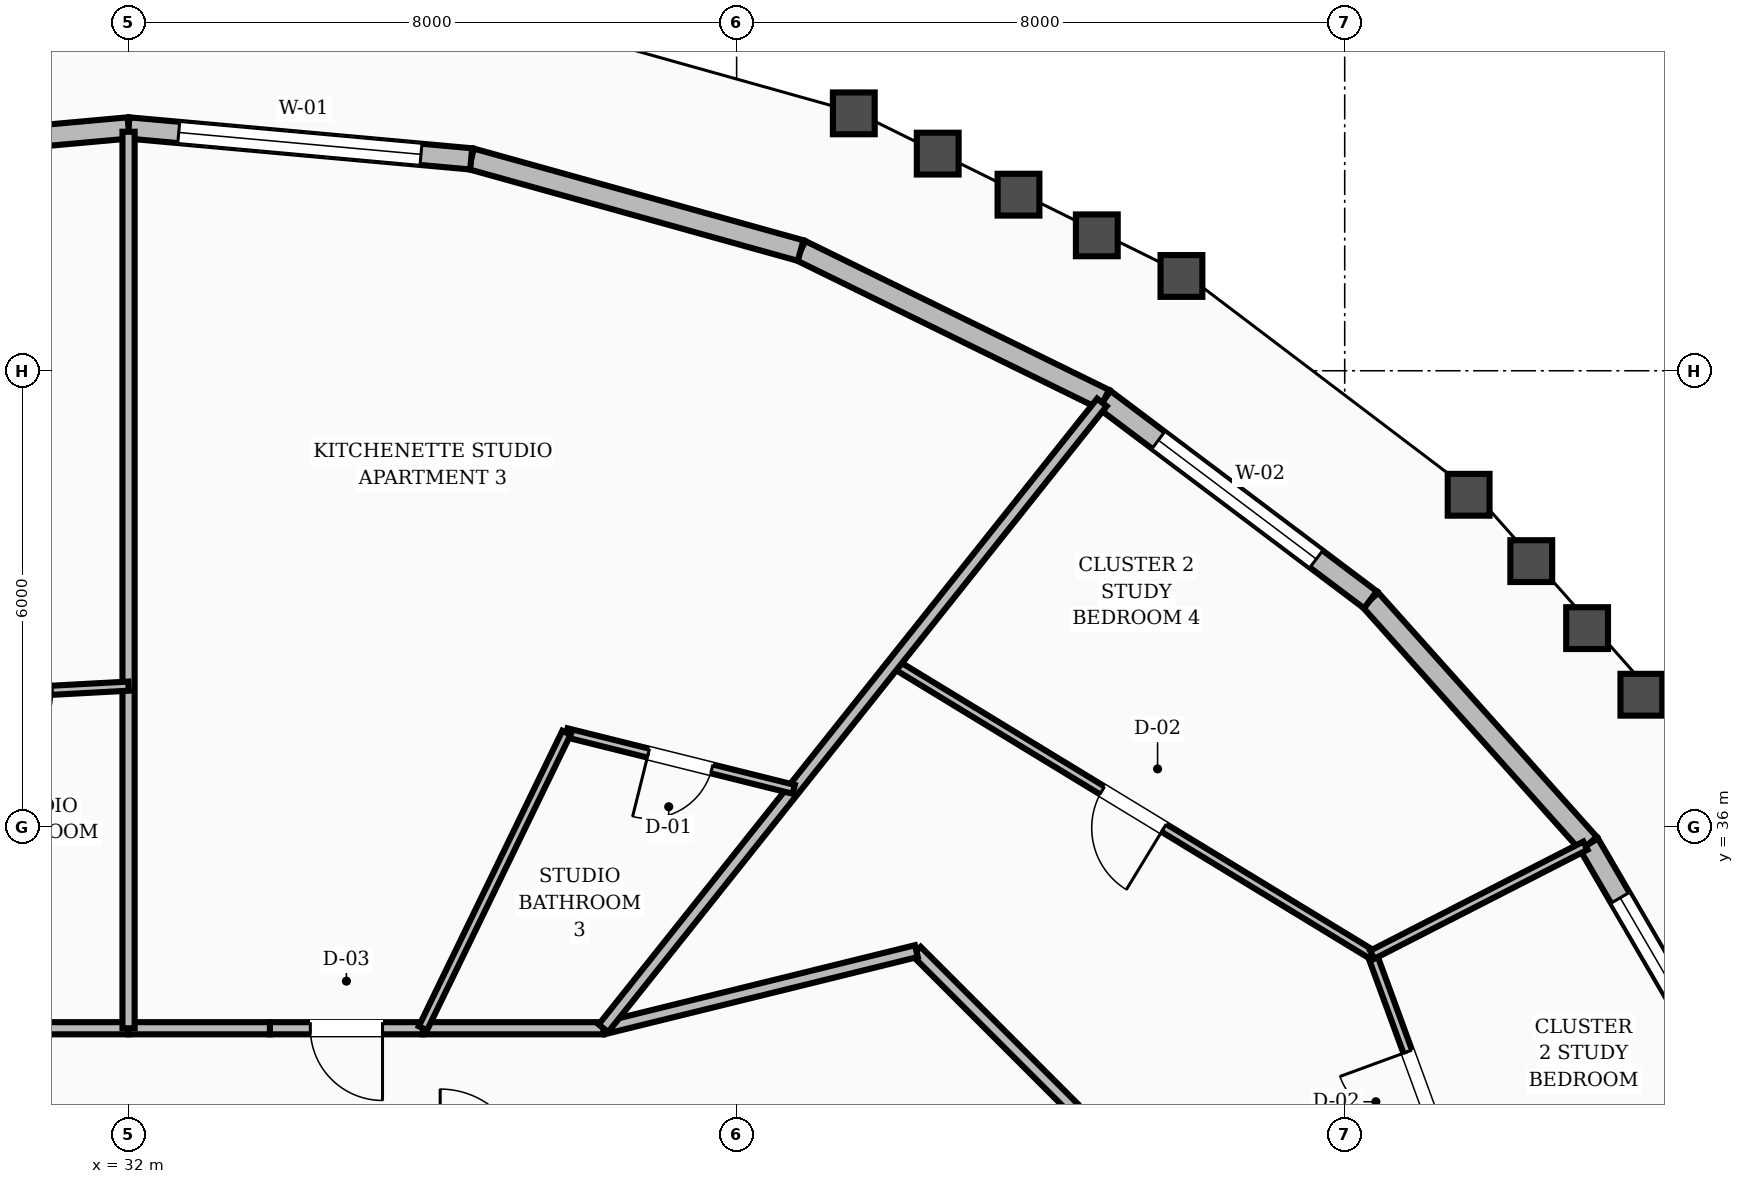
"""IFC4 building model, lengths in metres.
Left out: names, types, materials, properties, quantities, classifications, styles, units other than length and angle.
Written with IfcOpenShell. Run it as: python <this file> out.ifc"""

import sys

from ifc_helpers import new_model, si_unit, direction, frame, frame_2d, origin, place, context, subcontext, project, spatial, rectangle, extrude, element, fill, save


model = new_model("IFC4")
c1 = context("Model", 3, precision=1e-05, world=origin(), true_north=direction((0.0, 1.0)))
c2 = subcontext(c1, "Body", "Model", "MODEL_VIEW")
j1 = project(units=[si_unit("LENGTHUNIT", "METRE"), si_unit("PLANEANGLEUNIT", "RADIAN")], contexts=[c1])
p1 = place(None, origin())
s1 = spatial("IfcSite", under=j1, at=p1, CompositionType="ELEMENT")
p2 = place(p1, origin())
s2 = spatial("IfcBuilding", under=s1, at=p2, CompositionType="ELEMENT")
p3 = place(p2, frame((0.0, 0.0, 222.0)))
s3 = spatial("IfcBuildingStorey", under=s2, at=p3, CompositionType="ELEMENT", Elevation=222.0)
p4 = place(p3, frame((53.347, 32.111, 0.0), z_axis=(0.0, 0.0, 1.0), x_axis=(-0.503498718903, 0.863995972249, 0.0)))
e1 = element("IfcWall", 1, at=p4, inside=s3, PredefinedType="STANDARD", context=c2, shape_type="SweptSolid", body=[
    extrude(rectangle(XDim=4.241, YDim=0.28, at=frame_2d((2.12, 0.0))), origin(), (0.0, 0.0, 1.0), 2.88),
])
p5 = place(p4, frame((0.821, 0.0, 0.8)))
e2 = element("IfcOpeningElement", 2, at=p5, cuts=e1, PredefinedType="OPENING", context=c2, shape_type="SweptSolid", body=[
    extrude(rectangle(XDim=2.6, YDim=1.65, at=frame_2d((1.3, 0.825))), frame((0.0, 0.15, 0.0), z_axis=(0.0, -1.0, 0.0), x_axis=(1.0, 0.0, 0.0)), (0.0, 0.0, 1.0), 0.3),
])
p6 = place(p3, frame((51.211, 35.775, 0.0), z_axis=(0.0, 0.0, 1.0), x_axis=(-0.666726962521, 0.745302057858, 0.0)))
e3 = element("IfcWall", 3, at=p6, inside=s3, PredefinedType="STANDARD", context=c2, shape_type="SweptSolid", body=[
    extrude(rectangle(XDim=4.31, YDim=0.28, at=frame_2d((2.155, 0.0))), origin(), (0.0, 0.0, 1.0), 2.88),
])
p7 = place(p3, frame((48.338, 38.987, 0.0), z_axis=(0.0, 0.0, 1.0), x_axis=(-0.798942565337, 0.601407330594, 0.0)))
e4 = element("IfcWall", 4, at=p7, inside=s3, PredefinedType="STANDARD", context=c2, shape_type="SweptSolid", body=[
    extrude(rectangle(XDim=4.383, YDim=0.28, at=frame_2d((2.191, 0.0))), origin(), (0.0, 0.0, 1.0), 2.88),
])
p8 = place(p7, frame((0.891, 0.0, 0.8)))
e5 = element("IfcOpeningElement", 5, at=p8, cuts=e4, PredefinedType="OPENING", context=c2, shape_type="SweptSolid", body=[
    extrude(rectangle(XDim=2.6, YDim=1.65, at=frame_2d((1.3, 0.825))), frame((0.0, 0.15, 0.0), z_axis=(0.0, -1.0, 0.0), x_axis=(1.0, 0.0, 0.0)), (0.0, 0.0, 1.0), 0.3),
])
p9 = place(p3, frame((44.837, 41.623, 0.0), z_axis=(0.0, 0.0, 1.0), x_axis=(-0.897868409718, 0.440263919519, 0.0)))
e6 = element("IfcWall", 6, at=p9, inside=s3, PredefinedType="STANDARD", context=c2, shape_type="SweptSolid", body=[
    extrude(rectangle(XDim=4.449, YDim=0.28, at=frame_2d((2.225, 0.0))), origin(), (0.0, 0.0, 1.0), 2.88),
])
p10 = place(p3, frame((40.842, 43.581, 0.0), z_axis=(0.0, 0.0, 1.0), x_axis=(-0.963397305611, 0.268077659535, 0.0)))
e7 = element("IfcWall", 7, at=p10, inside=s3, PredefinedType="STANDARD", context=c2, shape_type="SweptSolid", body=[
    extrude(rectangle(XDim=4.499, YDim=0.28, at=frame_2d((2.25, 0.0))), origin(), (0.0, 0.0, 1.0), 2.88),
])
p11 = place(p3, frame((36.508, 44.787, 0.0), z_axis=(0.0, 0.0, 1.0), x_axis=(-0.995944333691, 0.089971574339, 0.0)))
e8 = element("IfcWall", 8, at=p11, inside=s3, PredefinedType="STANDARD", context=c2, shape_type="SweptSolid", body=[
    extrude(rectangle(XDim=4.526, YDim=0.28, at=frame_2d((2.263, 0.0))), origin(), (0.0, 0.0, 1.0), 2.88),
])
p12 = place(p11, frame((0.663, 0.0, 0.8)))
e9 = element("IfcOpeningElement", 9, at=p12, cuts=e8, PredefinedType="OPENING", context=c2, shape_type="SweptSolid", body=[
    extrude(rectangle(XDim=3.2, YDim=1.65, at=frame_2d((1.6, 0.825))), frame((0.0, 0.15, 0.0), z_axis=(0.0, -1.0, 0.0), x_axis=(1.0, 0.0, 0.0)), (0.0, 0.0, 1.0), 0.3),
])
p13 = place(p3, frame((32.0, 45.195, 0.0), z_axis=(0.0, 0.0, 1.0), x_axis=(-0.995944333691, -0.089971574339, 0.0)))
e10 = element("IfcWall", 10, at=p13, inside=s3, PredefinedType="STANDARD", context=c2, shape_type="SweptSolid", body=[
    extrude(rectangle(XDim=4.526, YDim=0.28, at=frame_2d((2.263, 0.0))), origin(), (0.0, 0.0, 1.0), 2.88),
])
p14 = place(p3, frame((44.427, 32.303, 0.0), z_axis=(0.0, 0.0, 1.0), x_axis=(-0.707106781187, 0.707106781187, 0.0)))
e11 = element("IfcWall", 11, at=p14, inside=s3, PredefinedType="SOLIDWALL", context=c2, shape_type="SweptSolid", body=[
    extrude(rectangle(XDim=2.916, YDim=0.16, at=frame_2d((1.458, 0.0))), origin(), (0.0, 0.0, 1.0), 2.87),
])
p15 = place(p3, frame((42.365, 34.365, 0.0), z_axis=(0.0, 0.0, 1.0), x_axis=(-0.970939799552, -0.239323850978, 0.0)))
e12 = element("IfcWall", 12, at=p15, inside=s3, PredefinedType="SOLIDWALL", context=c2, shape_type="SweptSolid", body=[
    extrude(rectangle(XDim=4.241, YDim=0.16, at=frame_2d((2.12, 0.0))), origin(), (0.0, 0.0, 1.0), 2.87),
])
p16 = place(p3, frame((38.248, 33.35, 0.0), z_axis=(0.0, 0.0, 1.0), x_axis=(-1.0, 0.0, 0.0)))
e13 = element("IfcWall", 13, at=p16, inside=s3, PredefinedType="SOLIDWALL", context=c2, shape_type="SweptSolid", body=[
    extrude(rectangle(XDim=2.375, YDim=0.16, at=frame_2d((1.188, 0.0))), origin(), (0.0, 0.0, 1.0), 2.87),
])
p17 = place(p3, frame((35.873, 33.35, 0.0), z_axis=(0.0, 0.0, 1.0), x_axis=(-1.0, 0.0, 0.0)))
e14 = element("IfcWall", 14, at=p17, inside=s3, PredefinedType="SOLIDWALL", context=c2, shape_type="SweptSolid", body=[
    extrude(rectangle(XDim=2.013, YDim=0.16, at=frame_2d((1.006, 0.0))), origin(), (0.0, 0.0, 1.0), 2.87),
])
p18 = place(p17, frame((0.531, 0.0, 0.0)))
e15 = element("IfcOpeningElement", 15, at=p18, cuts=e14, PredefinedType="OPENING", context=c2, shape_type="SweptSolid", body=[
    extrude(rectangle(XDim=0.95, YDim=2.1, at=frame_2d((0.475, 1.05))), frame((0.0, 0.09, 0.0), z_axis=(0.0, -1.0, 0.0), x_axis=(1.0, 0.0, 0.0)), (0.0, 0.0, 1.0), 0.18),
])
for number, where, z_axis, x_axis in (
    (16, (33.86, 33.35, 0.0), (0.0, 0.0, 1.0), (-1.0, 0.0, 0.0)),
    (17, (32.0, 33.35, 0.0), (0.0, 0.0, 1.0), (-1.0, 0.0, 0.0)),
):
    element("IfcWall", number, at=place(p3, frame(where, z_axis=z_axis, x_axis=x_axis)), inside=s3, PredefinedType="SOLIDWALL", context=c2, shape_type="SweptSolid", body=[
        extrude(rectangle(XDim=1.86, YDim=0.16, at=frame_2d((0.93, 0.0))), origin(), (0.0, 0.0, 1.0), 2.87),
    ])
p19 = place(p3, frame((49.623, 30.875, 0.0), z_axis=(0.0, 0.0, 1.0), x_axis=(-0.344047173744, 0.938952364201, 0.0)))
e18 = element("IfcWall", 18, at=p19, inside=s3, PredefinedType="PARTITIONING", context=c2, shape_type="SweptSolid", body=[
    extrude(rectangle(XDim=3.665, YDim=0.12, at=frame_2d((1.833, 0.0))), origin(), (0.0, 0.0, 1.0), 2.87),
])
p20 = place(p19, frame((1.358, 0.0, 0.0)))
e19 = element("IfcOpeningElement", 19, at=p20, cuts=e18, PredefinedType="OPENING", context=c2, shape_type="SweptSolid", body=[
    extrude(rectangle(XDim=0.95, YDim=2.1, at=frame_2d((0.475, 1.05))), frame((0.0, 0.07, 0.0), z_axis=(0.0, -1.0, 0.0), x_axis=(1.0, 0.0, 0.0)), (0.0, 0.0, 1.0), 0.14),
])
p21 = place(p3, frame((48.362, 34.317, 0.0), z_axis=(0.0, 0.0, 1.0), x_axis=(-0.854141598194, 0.520040508262, 0.0)))
e20 = element("IfcWall", 20, at=p21, inside=s3, PredefinedType="PARTITIONING", context=c2, shape_type="SweptSolid", body=[
    extrude(rectangle(XDim=7.367, YDim=0.12, at=frame_2d((3.684, 0.0))), origin(), (0.0, 0.0, 1.0), 2.87),
])
p22 = place(p21, frame((3.208, 0.0, 0.0)))
e21 = element("IfcOpeningElement", 21, at=p22, cuts=e20, PredefinedType="OPENING", context=c2, shape_type="SweptSolid", body=[
    extrude(rectangle(XDim=0.95, YDim=2.1, at=frame_2d((0.475, 1.05))), frame((0.0, 0.07, 0.0), z_axis=(0.0, -1.0, 0.0), x_axis=(1.0, 0.0, 0.0)), (0.0, 0.0, 1.0), 0.14),
])
p23 = place(p3, frame((48.362, 34.317, 0.0), z_axis=(0.0, 0.0, 1.0), x_axis=(0.890235742067, 0.455500080732, 0.0)))
e22 = element("IfcWall", 22, at=p23, inside=s3, PredefinedType="PARTITIONING", context=c2, shape_type="SweptSolid", body=[
    extrude(rectangle(XDim=3.151, YDim=0.12, at=frame_2d((1.576, 0.0))), origin(), (0.0, 0.0, 1.0), 2.87),
])
p24 = place(p3, frame((38.248, 33.35, 0.0), z_axis=(0.0, 0.0, 1.0), x_axis=(0.623021929745, 0.782204369112, 0.0)))
e23 = element("IfcWall", 23, at=p24, inside=s3, PredefinedType="SOLIDWALL", context=c2, shape_type="SweptSolid", body=[
    extrude(rectangle(XDim=10.526, YDim=0.16, at=frame_2d((5.263, 0.0))), origin(), (0.0, 0.0, 1.0), 2.87),
])
p25 = place(p3, frame((40.751, 36.494, 0.0), z_axis=(0.0, 0.0, 1.0), x_axis=(-0.97040292974, 0.241491519419, 0.0)))
e24 = element("IfcWall", 24, at=p25, inside=s3, PredefinedType="PARTITIONING", context=c2, shape_type="SweptSolid", body=[
    extrude(rectangle(XDim=3.082, YDim=0.12, at=frame_2d((1.541, 0.0))), origin(), (0.0, 0.0, 1.0), 2.87),
])
p26 = place(p25, frame((1.111, 0.0, 0.0)))
e25 = element("IfcOpeningElement", 25, at=p26, cuts=e24, PredefinedType="OPENING", context=c2, shape_type="SweptSolid", body=[
    extrude(rectangle(XDim=0.86, YDim=2.1, at=frame_2d((0.43, 1.05))), frame((0.0, 0.07, 0.0), z_axis=(0.0, -1.0, 0.0), x_axis=(1.0, 0.0, 0.0)), (0.0, 0.0, 1.0), 0.14),
])
p27 = place(p3, frame((35.873, 33.35, 0.0), z_axis=(0.0, 0.0, 1.0), x_axis=(0.43692616188, 0.899497375796, 0.0)))
e26 = element("IfcWall", 26, at=p27, inside=s3, PredefinedType="PARTITIONING", context=c2, shape_type="SweptSolid", body=[
    extrude(rectangle(XDim=4.322, YDim=0.12, at=frame_2d((2.161, 0.0))), origin(), (0.0, 0.0, 1.0), 2.87),
])
p28 = place(p3, frame((32.0, 33.35, 0.0), z_axis=(0.0, 0.0, 1.0), x_axis=(0.0, 1.0, 0.0)))
e27 = element("IfcWall", 27, at=p28, inside=s3, PredefinedType="SOLIDWALL", context=c2, shape_type="SweptSolid", body=[
    extrude(rectangle(XDim=11.794, YDim=0.16, at=frame_2d((5.897, 0.0))), origin(), (0.0, 0.0, 1.0), 2.87),
])
p29 = place(p3, frame((32.0, 37.851, 0.0), z_axis=(0.0, 0.0, 1.0), x_axis=(-0.998549327461, -0.053844597009, 0.0)))
e28 = element("IfcWall", 28, at=p29, inside=s3, PredefinedType="PARTITIONING", context=c2, shape_type="SweptSolid", body=[
    extrude(rectangle(XDim=2.87, YDim=0.12, at=frame_2d((1.435, 0.0))), origin(), (0.0, 0.0, 1.0), 2.87),
])
p30 = place(p29, frame((1.005, 0.0, 0.0)))
e29 = element("IfcOpeningElement", 29, at=p30, cuts=e28, PredefinedType="OPENING", context=c2, shape_type="SweptSolid", body=[
    extrude(rectangle(XDim=0.86, YDim=2.1, at=frame_2d((0.43, 1.05))), frame((0.0, 0.07, 0.0), z_axis=(0.0, -1.0, 0.0), x_axis=(1.0, 0.0, 0.0)), (0.0, 0.0, 1.0), 0.14),
])
p31 = place(p5, origin())
e30 = element("IfcWindow", 30, at=p31, inside=s3, PartitioningType="SINGLE_PANEL", PredefinedType="WINDOW", context=c2, shape_type="SweptSolid", body=[
    extrude(rectangle(XDim=2.6, YDim=1.65, at=frame_2d((1.3, 0.825))), frame((0.0, 0.03, 0.0), z_axis=(0.0, -1.0, 0.0), x_axis=(1.0, 0.0, 0.0)), (0.0, 0.0, 1.0), 0.06),
])
fill(e2, e30)
p32 = place(p8, origin())
e31 = element("IfcWindow", 31, at=p32, inside=s3, PartitioningType="SINGLE_PANEL", PredefinedType="WINDOW", context=c2, shape_type="SweptSolid", body=[
    extrude(rectangle(XDim=2.6, YDim=1.65, at=frame_2d((1.3, 0.825))), frame((0.0, 0.03, 0.0), z_axis=(0.0, -1.0, 0.0), x_axis=(1.0, 0.0, 0.0)), (0.0, 0.0, 1.0), 0.06),
])
fill(e5, e31)
p33 = place(p12, origin())
e32 = element("IfcWindow", 32, at=p33, inside=s3, PartitioningType="SINGLE_PANEL", PredefinedType="WINDOW", context=c2, shape_type="SweptSolid", body=[
    extrude(rectangle(XDim=3.2, YDim=1.65, at=frame_2d((1.6, 0.825))), frame((0.0, 0.03, 0.0), z_axis=(0.0, -1.0, 0.0), x_axis=(1.0, 0.0, 0.0)), (0.0, 0.0, 1.0), 0.06),
])
fill(e9, e32)
p34 = place(p20, origin())
e33 = element("IfcDoor", 33, at=p34, inside=s3, OperationType="SINGLE_SWING_RIGHT", PredefinedType="DOOR", context=c2, shape_type="SweptSolid", body=[
    extrude(rectangle(XDim=0.95, YDim=2.1, at=frame_2d((0.475, 1.05))), frame((0.0, 0.025, 0.0), z_axis=(0.0, -1.0, 0.0), x_axis=(1.0, 0.0, 0.0)), (0.0, 0.0, 1.0), 0.05),
])
fill(e19, e33)
p35 = place(p22, origin())
e34 = element("IfcDoor", 34, at=p35, inside=s3, OperationType="SINGLE_SWING_LEFT", PredefinedType="DOOR", context=c2, shape_type="SweptSolid", body=[
    extrude(rectangle(XDim=0.95, YDim=2.1, at=frame_2d((0.475, 1.05))), frame((0.0, 0.025, 0.0), z_axis=(0.0, -1.0, 0.0), x_axis=(1.0, 0.0, 0.0)), (0.0, 0.0, 1.0), 0.05),
])
fill(e21, e34)
p36 = place(p26, origin())
e35 = element("IfcDoor", 35, at=p36, inside=s3, OperationType="SINGLE_SWING_RIGHT", PredefinedType="DOOR", context=c2, shape_type="SweptSolid", body=[
    extrude(rectangle(XDim=0.86, YDim=2.1, at=frame_2d((0.43, 1.05))), frame((0.0, 0.025, 0.0), z_axis=(0.0, -1.0, 0.0), x_axis=(1.0, 0.0, 0.0)), (0.0, 0.0, 1.0), 0.05),
])
fill(e25, e35)
p37 = place(p18, origin())
e36 = element("IfcDoor", 36, at=p37, inside=s3, OperationType="SINGLE_SWING_LEFT", PredefinedType="DOOR", context=c2, shape_type="SweptSolid", body=[
    extrude(rectangle(XDim=0.95, YDim=2.1, at=frame_2d((0.475, 1.05))), frame((0.0, 0.025, 0.0), z_axis=(0.0, -1.0, 0.0), x_axis=(1.0, 0.0, 0.0)), (0.0, 0.0, 1.0), 0.05),
])
fill(e15, e36)
save(model, sys.argv[1])
